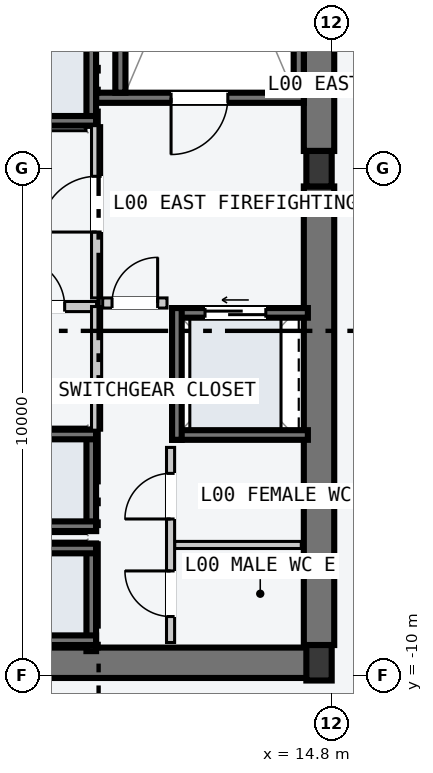
"""IFC4 building model, lengths in metres.
Left out: names, types, materials, properties, quantities, classifications, styles, units other than length and angle.
Written with IfcOpenShell. Run it as: python <this file> out.ifc"""

import sys

from ifc_helpers import new_model, si_unit, direction, frame, frame_2d, origin, origin_2d, place, context, subcontext, project, spatial, rectangle, i_section, extrude, element, fill, save


model = new_model("IFC4")
c1 = context("Model", 3, precision=1e-05, world=origin(), true_north=direction((0.0, 1.0)))
c2 = subcontext(c1, "Body", "Model", "MODEL_VIEW")
j1 = project(units=[si_unit("LENGTHUNIT", "METRE"), si_unit("PLANEANGLEUNIT", "RADIAN")], contexts=[c1])
p1 = place(None, origin())
s1 = spatial("IfcSite", under=j1, at=p1, CompositionType="ELEMENT")
p2 = place(p1, origin())
s2 = spatial("IfcBuilding", under=s1, at=p2, CompositionType="ELEMENT")
p3 = place(p2, origin())
s3 = spatial("IfcBuildingStorey", under=s2, at=p3, CompositionType="ELEMENT", Elevation=0.0)
p4 = place(p3, frame((8.07, -9.75, -0.22), z_axis=(0.0, 0.0, 1.0), x_axis=(1.0, 0.0, 0.0)))
e1 = element("IfcWall", 1, at=p4, inside=s3, PredefinedType="SHEAR", context=c2, shape_type="SweptSolid", body=[
    extrude(rectangle(XDim=6.46, YDim=0.6, at=frame_2d((3.23, 0.0))), origin(), (0.0, 0.0, 1.0), 4.8),
])
for number, where, z_axis, x_axis in (
    (2, (14.55, -9.4, -0.22), (0.0, 0.0, 1.0), (0.0, 1.0, 0.0)),
    (3, (14.55, 0.35, -0.22), (0.0, 0.0, 1.0), (0.0, 1.0, 0.0)),
):
    element("IfcWall", number, at=place(p3, frame(where, z_axis=z_axis, x_axis=x_axis)), inside=s3, PredefinedType="SHEAR", context=c2, shape_type="SweptSolid", body=[
        extrude(rectangle(XDim=9.05, YDim=0.6, at=frame_2d((4.525, 0.0))), origin(), (0.0, 0.0, 1.0), 4.8),
    ])
p5 = place(p3, frame((14.15, 1.5, -0.22), z_axis=(0.0, 0.0, 1.0), x_axis=(0.0, 1.0, 0.0)))
e4 = element("IfcWall", 4, at=p5, inside=s3, PredefinedType="SOLIDWALL", context=c2, shape_type="SweptSolid", body=[
    extrude(rectangle(XDim=7.8, YDim=0.2, at=frame_2d((3.9, 0.0))), origin(), (0.0, 0.0, 1.0), 4.8),
])
p6 = place(p3, frame((14.25, 1.4, -0.22), z_axis=(0.0, 0.0, 1.0), x_axis=(-1.0, 0.0, 0.0)))
e5 = element("IfcWall", 5, at=p6, inside=s3, PredefinedType="SOLIDWALL", context=c2, shape_type="SweptSolid", body=[
    extrude(rectangle(XDim=4.1, YDim=0.2, at=frame_2d((2.05, 0.0))), origin(), (0.0, 0.0, 1.0), 4.8),
])
p7 = place(p6, frame((1.5, 0.0, 0.22)))
e6 = element("IfcOpeningElement", 6, at=p7, cuts=e5, PredefinedType="OPENING", context=c2, shape_type="SweptSolid", body=[
    extrude(rectangle(XDim=1.12, YDim=2.18, at=frame_2d((0.56, 1.09))), frame((0.0, 0.11, 0.0), z_axis=(0.0, -1.0, 0.0), x_axis=(1.0, 0.0, 0.0)), (0.0, 0.0, 1.0), 0.22),
])
p8 = place(p3, frame((10.63, 1.5, -0.22), z_axis=(0.0, 0.0, 1.0), x_axis=(0.0, 1.0, 0.0)))
e7 = element("IfcWall", 7, at=p8, inside=s3, PredefinedType="SOLIDWALL", context=c2, shape_type="SweptSolid", body=[
    extrude(rectangle(XDim=7.8, YDim=0.2, at=frame_2d((3.9, 0.0))), origin(), (0.0, 0.0, 1.0), 4.8),
])
for number, where, z_axis, x_axis in (
    (8, (14.55, -9.75, 0.0), (0.0, 0.0, 1.0), (1.0, 0.0, 0.0)),
    (9, (14.55, 0.0, 0.0), (0.0, 0.0, 1.0), (1.0, 0.0, 0.0)),
):
    element("IfcColumn", number, at=place(p3, frame(where, z_axis=z_axis, x_axis=x_axis)), inside=s3, PredefinedType="COLUMN", context=c2, shape_type="SweptSolid", body=[
        extrude(i_section(OverallWidth=0.5, OverallDepth=0.7, WebThickness=0.028, FlangeThickness=0.045, at=origin_2d()), origin(), (0.0, 0.0, 1.0), 4.8),
    ])
p9 = place(p3, frame((10.055, 0.85, -0.22), z_axis=(0.0, 0.0, 1.0), x_axis=(0.0, 1.0, 0.0)))
e10 = element("IfcWall", 10, at=p9, inside=s3, PredefinedType="SOLIDWALL", context=c2, shape_type="SweptSolid", body=[
    extrude(rectangle(XDim=1.9, YDim=0.19, at=frame_2d((0.95, 0.0))), origin(), (0.0, 0.0, 1.0), 4.8),
])
p10 = place(p3, frame((7.95, 0.945, -0.22), z_axis=(0.0, 0.0, 1.0), x_axis=(1.0, 0.0, 0.0)))
e11 = element("IfcWall", 11, at=p10, inside=s3, PredefinedType="SOLIDWALL", context=c2, shape_type="SweptSolid", body=[
    extrude(rectangle(XDim=2.2, YDim=0.19, at=frame_2d((1.1, 0.0))), origin(), (0.0, 0.0, 1.0), 4.8),
])
p11 = place(p3, frame((10.055, -9.52, -0.22), z_axis=(0.0, 0.0, 1.0), x_axis=(0.0, 1.0, 0.0)))
e12 = element("IfcWall", 12, at=p11, inside=s3, PredefinedType="SOLIDWALL", context=c2, shape_type="SweptSolid", body=[
    extrude(rectangle(XDim=2.12, YDim=0.19, at=frame_2d((1.06, 0.0))), origin(), (0.0, 0.0, 1.0), 4.8),
])
for number, where, z_axis, x_axis in (
    (13, (7.95, -7.495, -0.22), (0.0, 0.0, 1.0), (1.0, 0.0, 0.0)),
    (14, (7.95, -9.305, -0.22), (0.0, 0.0, 1.0), (1.0, 0.0, 0.0)),
):
    element("IfcWall", number, at=place(p3, frame(where, z_axis=z_axis, x_axis=x_axis)), inside=s3, PredefinedType="SOLIDWALL", context=c2, shape_type="SweptSolid", body=[
        extrude(rectangle(XDim=2.2, YDim=0.19, at=frame_2d((1.1, 0.0))), origin(), (0.0, 0.0, 1.0), 4.8),
    ])
p12 = place(p3, frame((10.055, -7.15, -0.22), z_axis=(0.0, 0.0, 1.0), x_axis=(0.0, 1.0, 0.0)))
e15 = element("IfcWall", 15, at=p12, inside=s3, PredefinedType="SOLIDWALL", context=c2, shape_type="SweptSolid", body=[
    extrude(rectangle(XDim=2.0, YDim=0.19, at=frame_2d((1.0, 0.0))), origin(), (0.0, 0.0, 1.0), 4.8),
])
for number, where, z_axis, x_axis in (
    (16, (7.95, -5.245, -0.22), (0.0, 0.0, 1.0), (1.0, 0.0, 0.0)),
    (17, (7.95, -7.055, -0.22), (0.0, 0.0, 1.0), (1.0, 0.0, 0.0)),
):
    element("IfcWall", number, at=place(p3, frame(where, z_axis=z_axis, x_axis=x_axis)), inside=s3, PredefinedType="SOLIDWALL", context=c2, shape_type="SweptSolid", body=[
        extrude(rectangle(XDim=2.2, YDim=0.19, at=frame_2d((1.1, 0.0))), origin(), (0.0, 0.0, 1.0), 4.8),
    ])
p13 = place(p3, frame((11.65, -2.845, -0.22), z_axis=(0.0, 0.0, 1.0), x_axis=(1.0, 0.0, 0.0)))
e18 = element("IfcWall", 18, at=p13, inside=s3, PredefinedType="SOLIDWALL", context=c2, shape_type="SweptSolid", body=[
    extrude(rectangle(XDim=2.68, YDim=0.19, at=frame_2d((1.34, 0.0))), origin(), (0.0, 0.0, 1.0), 4.8),
])
p14 = place(p13, frame((0.65, 0.0, 0.22)))
e19 = element("IfcOpeningElement", 19, at=p14, cuts=e18, PredefinedType="OPENING", context=c2, shape_type="SweptSolid", body=[
    extrude(rectangle(XDim=1.2, YDim=2.2, at=frame_2d((0.6, 1.1))), frame((0.0, 0.105, 0.0), z_axis=(0.0, -1.0, 0.0), x_axis=(1.0, 0.0, 0.0)), (0.0, 0.0, 1.0), 0.21),
])
p15 = place(p3, frame((11.65, -5.255, -0.22), z_axis=(0.0, 0.0, 1.0), x_axis=(1.0, 0.0, 0.0)))
e20 = element("IfcWall", 20, at=p15, inside=s3, PredefinedType="SOLIDWALL", context=c2, shape_type="SweptSolid", body=[
    extrude(rectangle(XDim=2.68, YDim=0.19, at=frame_2d((1.34, 0.0))), origin(), (0.0, 0.0, 1.0), 4.8),
])
p16 = place(p3, frame((11.745, -5.35, -0.22), z_axis=(0.0, 0.0, 1.0), x_axis=(0.0, 1.0, 0.0)))
e21 = element("IfcWall", 21, at=p16, inside=s3, PredefinedType="SOLIDWALL", context=c2, shape_type="SweptSolid", body=[
    extrude(rectangle(XDim=2.6, YDim=0.19, at=frame_2d((1.3, 0.0))), origin(), (0.0, 0.0, 1.0), 4.8),
])
p17 = place(p3, frame((10.16, -2.55, 0.0), z_axis=(0.0, 0.0, 1.0), x_axis=(0.0, 1.0, 0.0)))
e22 = element("IfcWall", 22, at=p17, inside=s3, PredefinedType="PARTITIONING", context=c2, shape_type="SweptSolid", body=[
    extrude(rectangle(XDim=3.4, YDim=0.2, at=frame_2d((1.7, 0.0))), origin(), (0.0, 0.0, 1.0), 4.58),
])
p18 = place(p17, frame((1.3, 0.0, 0.0)))
e23 = element("IfcOpeningElement", 23, at=p18, cuts=e22, PredefinedType="OPENING", context=c2, shape_type="SweptSolid", body=[
    extrude(rectangle(XDim=1.1, YDim=2.15, at=frame_2d((0.55, 1.075))), frame((0.0, 0.11, 0.0), z_axis=(0.0, -1.0, 0.0), x_axis=(1.0, 0.0, 0.0)), (0.0, 0.0, 1.0), 0.22),
])
p19 = place(p3, frame((10.28, -2.65, 0.0), z_axis=(0.0, 0.0, 1.0), x_axis=(1.0, 0.0, 0.0)))
e24 = element("IfcWall", 24, at=p19, inside=s3, PredefinedType="PARTITIONING", context=c2, shape_type="SweptSolid", body=[
    extrude(rectangle(XDim=1.27, YDim=0.2, at=frame_2d((0.635, 0.0))), origin(), (0.0, 0.0, 1.0), 4.58),
])
p20 = place(p19, frame((0.185, 0.0, 0.0)))
e25 = element("IfcOpeningElement", 25, at=p20, cuts=e24, PredefinedType="OPENING", context=c2, shape_type="SweptSolid", body=[
    extrude(rectangle(XDim=0.9, YDim=2.15, at=frame_2d((0.45, 1.075))), frame((0.0, 0.11, 0.0), z_axis=(0.0, -1.0, 0.0), x_axis=(1.0, 0.0, 0.0)), (0.0, 0.0, 1.0), 0.22),
])
p21 = place(p3, frame((7.96, -2.72, 0.0), z_axis=(0.0, 0.0, 1.0), x_axis=(1.0, 0.0, 0.0)))
e26 = element("IfcWall", 26, at=p21, inside=s3, PredefinedType="PARTITIONING", context=c2, shape_type="SweptSolid", body=[
    extrude(rectangle(XDim=2.2, YDim=0.2, at=frame_2d((1.1, 0.0))), origin(), (0.0, 0.0, 1.0), 4.58),
])
p22 = place(p21, frame((0.62, 0.0, 0.0)))
e27 = element("IfcOpeningElement", 27, at=p22, cuts=e26, PredefinedType="OPENING", context=c2, shape_type="SweptSolid", body=[
    extrude(rectangle(XDim=0.95, YDim=2.1, at=frame_2d((0.475, 1.05))), frame((0.0, 0.11, 0.0), z_axis=(0.0, -1.0, 0.0), x_axis=(1.0, 0.0, 0.0)), (0.0, 0.0, 1.0), 0.22),
])
p23 = place(p3, frame((10.16, -5.16, 0.0), z_axis=(0.0, 0.0, 1.0), x_axis=(0.0, 1.0, 0.0)))
e28 = element("IfcWall", 28, at=p23, inside=s3, PredefinedType="PARTITIONING", context=c2, shape_type="SweptSolid", body=[
    extrude(rectangle(XDim=2.44, YDim=0.2, at=frame_2d((1.22, 0.0))), origin(), (0.0, 0.0, 1.0), 4.58),
])
p24 = place(p3, frame((11.7, -7.425, 0.0), z_axis=(0.0, 0.0, 1.0), x_axis=(1.0, 0.0, 0.0)))
e29 = element("IfcWall", 29, at=p24, inside=s3, PredefinedType="PARTITIONING", context=c2, shape_type="SweptSolid", body=[
    extrude(rectangle(XDim=2.5, YDim=0.14, at=frame_2d((1.25, 0.0))), origin(), (0.0, 0.0, 1.0), 4.58),
])
p25 = place(p3, frame((11.62, -9.35, 0.0), z_axis=(0.0, 0.0, 1.0), x_axis=(0.0, 1.0, 0.0)))
e30 = element("IfcWall", 30, at=p25, inside=s3, PredefinedType="PARTITIONING", context=c2, shape_type="SweptSolid", body=[
    extrude(rectangle(XDim=3.85, YDim=0.16, at=frame_2d((1.925, 0.0))), origin(), (0.0, 0.0, 1.0), 4.58),
])
p26 = place(p25, frame((0.512, 0.0, 0.0)))
e31 = element("IfcOpeningElement", 31, at=p26, cuts=e30, PredefinedType="OPENING", context=c2, shape_type="SweptSolid", body=[
    extrude(rectangle(XDim=0.9, YDim=2.15, at=frame_2d((0.45, 1.075))), frame((0.0, 0.09, 0.0), z_axis=(0.0, -1.0, 0.0), x_axis=(1.0, 0.0, 0.0)), (0.0, 0.0, 1.0), 0.18),
])
p27 = place(p25, frame((2.438, 0.0, 0.0)))
e32 = element("IfcOpeningElement", 32, at=p27, cuts=e30, PredefinedType="OPENING", context=c2, shape_type="SweptSolid", body=[
    extrude(rectangle(XDim=0.9, YDim=2.15, at=frame_2d((0.45, 1.075))), frame((0.0, 0.09, 0.0), z_axis=(0.0, -1.0, 0.0), x_axis=(1.0, 0.0, 0.0)), (0.0, 0.0, 1.0), 0.18),
])
p28 = place(p7, origin())
e33 = element("IfcDoor", 33, at=p28, inside=s3, OperationType="SINGLE_SWING_RIGHT", PredefinedType="DOOR", context=c2, shape_type="SweptSolid", body=[
    extrude(rectangle(XDim=1.12, YDim=2.18, at=frame_2d((0.56, 1.09))), frame((0.0, 0.025, 0.0), z_axis=(0.0, -1.0, 0.0), x_axis=(1.0, 0.0, 0.0)), (0.0, 0.0, 1.0), 0.05),
])
fill(e6, e33)
p29 = place(p14, origin())
e34 = element("IfcDoor", 34, at=p29, inside=s3, OperationType="SLIDING_TO_LEFT", PredefinedType="DOOR", context=c2, shape_type="SweptSolid", body=[
    extrude(rectangle(XDim=1.2, YDim=2.2, at=frame_2d((0.6, 1.1))), frame((0.0, 0.025, 0.0), z_axis=(0.0, -1.0, 0.0), x_axis=(1.0, 0.0, 0.0)), (0.0, 0.0, 1.0), 0.05),
])
fill(e19, e34)
p30 = place(p18, origin())
e35 = element("IfcDoor", 35, at=p30, inside=s3, OperationType="SINGLE_SWING_LEFT", PredefinedType="DOOR", context=c2, shape_type="SweptSolid", body=[
    extrude(rectangle(XDim=1.1, YDim=2.15, at=frame_2d((0.55, 1.075))), frame((0.0, 0.025, 0.0), z_axis=(0.0, -1.0, 0.0), x_axis=(1.0, 0.0, 0.0)), (0.0, 0.0, 1.0), 0.05),
])
fill(e23, e35)
p31 = place(p20, origin())
e36 = element("IfcDoor", 36, at=p31, inside=s3, OperationType="SINGLE_SWING_RIGHT", PredefinedType="DOOR", context=c2, shape_type="SweptSolid", body=[
    extrude(rectangle(XDim=0.9, YDim=2.15, at=frame_2d((0.45, 1.075))), frame((0.0, 0.025, 0.0), z_axis=(0.0, -1.0, 0.0), x_axis=(1.0, 0.0, 0.0)), (0.0, 0.0, 1.0), 0.05),
])
fill(e25, e36)
p32 = place(p22, origin())
e37 = element("IfcDoor", 37, at=p32, inside=s3, OperationType="SINGLE_SWING_LEFT", PredefinedType="DOOR", context=c2, shape_type="SweptSolid", body=[
    extrude(rectangle(XDim=0.95, YDim=2.1, at=frame_2d((0.475, 1.05))), frame((0.0, 0.025, 0.0), z_axis=(0.0, -1.0, 0.0), x_axis=(1.0, 0.0, 0.0)), (0.0, 0.0, 1.0), 0.05),
])
fill(e27, e37)
p33 = place(p26, origin())
e38 = element("IfcDoor", 38, at=p33, inside=s3, OperationType="SINGLE_SWING_RIGHT", PredefinedType="DOOR", context=c2, shape_type="SweptSolid", body=[
    extrude(rectangle(XDim=0.9, YDim=2.15, at=frame_2d((0.45, 1.075))), frame((0.0, 0.025, 0.0), z_axis=(0.0, -1.0, 0.0), x_axis=(1.0, 0.0, 0.0)), (0.0, 0.0, 1.0), 0.05),
])
fill(e31, e38)
p34 = place(p27, origin())
e39 = element("IfcDoor", 39, at=p34, inside=s3, OperationType="SINGLE_SWING_LEFT", PredefinedType="DOOR", context=c2, shape_type="SweptSolid", body=[
    extrude(rectangle(XDim=0.9, YDim=2.15, at=frame_2d((0.45, 1.075))), frame((0.0, 0.025, 0.0), z_axis=(0.0, -1.0, 0.0), x_axis=(1.0, 0.0, 0.0)), (0.0, 0.0, 1.0), 0.05),
])
fill(e32, e39)
save(model, sys.argv[1])
